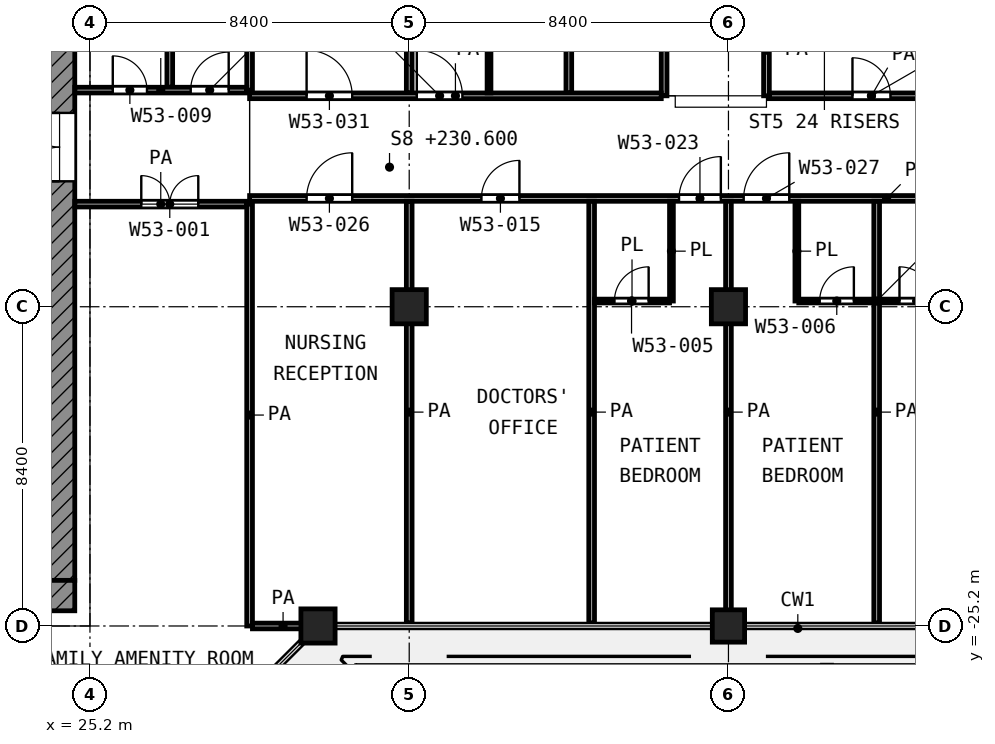
"""IFC4 building model, lengths in metres.
Left out: names, types, materials, properties, quantities, classifications, styles, units other than length and angle.
Written with IfcOpenShell. Run it as: python <this file> out.ifc"""

import sys

from ifc_helpers import new_model, si_unit, direction, frame, frame_2d, origin, origin_2d, place, context, subcontext, project, spatial, rectangle, extrude, element, fill, save


model = new_model("IFC4")
c1 = context("Model", 3, precision=1e-05, world=origin(), true_north=direction((0.0, 1.0)))
c2 = subcontext(c1, "Body", "Model", "MODEL_VIEW")
j1 = project(units=[si_unit("LENGTHUNIT", "METRE"), si_unit("PLANEANGLEUNIT", "RADIAN")], contexts=[c1])
p1 = place(None, origin())
s1 = spatial("IfcSite", under=j1, at=p1, CompositionType="ELEMENT")
p2 = place(p1, origin())
s2 = spatial("IfcBuilding", under=s1, at=p2, CompositionType="ELEMENT")
p3 = place(p2, frame((0.0, 0.0, 230.6)))
s3 = spatial("IfcBuildingStorey", under=s2, at=p3, CompositionType="ELEMENT", Elevation=230.6)
for number, where, z_axis, x_axis in (
    (1, (33.6, -16.8, 0.0), (0.0, 0.0, 1.0), (1.0, 0.0, 0.0)),
    (2, (42.0, -16.8, 0.0), (0.0, 0.0, 1.0), (1.0, 0.0, 0.0)),
    (3, (31.2, -25.2, 0.0), (0.0, 0.0, 1.0), (1.0, 0.0, 0.0)),
):
    element("IfcColumn", number, at=place(p3, frame(where, z_axis=z_axis, x_axis=x_axis)), inside=s3, PredefinedType="COLUMN", context=c2, shape_type="SweptSolid", body=[
        extrude(rectangle(XDim=0.9, YDim=0.9, at=origin_2d()), origin(), (0.0, 0.0, 1.0), 4.2),
    ])
p4 = place(p3, frame((42.0, -25.2, 0.0), z_axis=(0.0, 0.0, 1.0), x_axis=(1.0, 0.0, 0.0)))
e4 = element("IfcColumn", 4, at=p4, inside=s3, PredefinedType="COLUMN", context=c2, shape_type="SweptSolid", body=[
    extrude(rectangle(XDim=0.85, YDim=0.85, at=origin_2d()), origin(), (0.0, 0.0, 1.0), 4.2),
])
p5 = place(p3, frame((24.4, -24.0, 0.0), z_axis=(0.0, 0.0, 1.0), x_axis=(0.0, 1.0, 0.0)))
e5 = element("IfcWall", 5, at=p5, inside=s3, PredefinedType="SHEAR", context=c2, shape_type="SweptSolid", body=[
    extrude(rectangle(XDim=18.6, YDim=0.8, at=frame_2d((9.3, 0.0))), origin(), (0.0, 0.0, 1.0), 3.6),
])
p6 = place(p5, frame((10.5, 0.0, 0.0)))
e6 = element("IfcOpeningElement", 6, at=p6, cuts=e5, PredefinedType="OPENING", context=c2, shape_type="SweptSolid", body=[
    extrude(rectangle(XDim=1.8, YDim=2.1, at=frame_2d((0.9, 1.05))), frame((0.0, 0.41, 0.0), z_axis=(0.0, -1.0, 0.0), x_axis=(1.0, 0.0, 0.0)), (0.0, 0.0, 1.0), 0.82),
])
p7 = place(p3, frame((24.4, -24.8, 0.0), z_axis=(0.0, 0.0, 1.0), x_axis=(0.0, 1.0, 0.0)))
e7 = element("IfcWall", 7, at=p7, inside=s3, PredefinedType="SHEAR", context=c2, shape_type="SweptSolid", body=[
    extrude(rectangle(XDim=0.8, YDim=0.8, at=frame_2d((0.4, 0.0))), origin(), (0.0, 0.0, 1.0), 3.6),
])
p8 = place(p3, frame((38.475, -16.65, 0.0), z_axis=(0.0, 0.0, 1.0), x_axis=(1.0, 0.0, 0.0)))
e8 = element("IfcWall", 8, at=p8, inside=s3, PredefinedType="PARTITIONING", context=c2, shape_type="SweptSolid", body=[
    extrude(rectangle(XDim=1.975, YDim=0.1, at=frame_2d((0.987, 0.0))), origin(), (0.0, 0.0, 1.0), 3.6),
])
p9 = place(p8, frame((0.525, 0.0, 0.0)))
e9 = element("IfcOpeningElement", 9, at=p9, cuts=e8, PredefinedType="OPENING", context=c2, shape_type="SweptSolid", body=[
    extrude(rectangle(XDim=0.9, YDim=2.1, at=frame_2d((0.45, 1.05))), frame((0.0, 0.06, 0.0), z_axis=(0.0, -1.0, 0.0), x_axis=(1.0, 0.0, 0.0)), (0.0, 0.0, 1.0), 0.12),
])
p10 = place(p3, frame((43.85, -16.65, 0.0), z_axis=(0.0, 0.0, 1.0), x_axis=(1.0, 0.0, 0.0)))
e10 = element("IfcWall", 10, at=p10, inside=s3, PredefinedType="PARTITIONING", context=c2, shape_type="SweptSolid", body=[
    extrude(rectangle(XDim=4.1, YDim=0.1, at=frame_2d((2.05, 0.0))), origin(), (0.0, 0.0, 1.0), 3.6),
])
p11 = place(p10, frame((0.55, 0.0, 0.0)))
e11 = element("IfcOpeningElement", 11, at=p11, cuts=e10, PredefinedType="OPENING", context=c2, shape_type="SweptSolid", body=[
    extrude(rectangle(XDim=0.9, YDim=2.1, at=frame_2d((0.45, 1.05))), frame((0.0, 0.06, 0.0), z_axis=(0.0, -1.0, 0.0), x_axis=(1.0, 0.0, 0.0)), (0.0, 0.0, 1.0), 0.12),
])
p12 = place(p10, frame((2.65, 0.0, 0.0)))
e12 = element("IfcOpeningElement", 12, at=p12, cuts=e10, PredefinedType="OPENING", context=c2, shape_type="SweptSolid", body=[
    extrude(rectangle(XDim=0.9, YDim=2.1, at=frame_2d((0.45, 1.05))), frame((0.0, 0.06, 0.0), z_axis=(0.0, -1.0, 0.0), x_axis=(1.0, 0.0, 0.0)), (0.0, 0.0, 1.0), 0.12),
])
for number, where, z_axis, x_axis in (
    (13, (35.7, -11.175, 0.0), (0.0, 0.0, 1.0), (0.0, 1.0, 0.0)),
    (14, (40.5, -16.65, 0.0), (0.0, 0.0, 1.0), (0.0, 1.0, 0.0)),
    (15, (43.8, -16.65, 0.0), (0.0, 0.0, 1.0), (0.0, 1.0, 0.0)),
):
    element("IfcWall", number, at=place(p3, frame(where, z_axis=z_axis, x_axis=x_axis)), inside=s3, PredefinedType="PARTITIONING", context=c2, shape_type="SweptSolid", body=[
        extrude(rectangle(XDim=2.625, YDim=0.1, at=frame_2d((1.312, 0.0))), origin(), (0.0, 0.0, 1.0), 3.6),
    ])
p13 = place(p3, frame((29.475, -25.2, 0.0), z_axis=(0.0, 0.0, 1.0), x_axis=(1.0, 0.0, 0.0)))
e16 = element("IfcWall", 16, at=p13, inside=s3, PredefinedType="PARTITIONING", context=c2, shape_type="SweptSolid", body=[
    extrude(rectangle(XDim=1.612, YDim=0.15, at=frame_2d((0.806, 0.0))), origin(), (0.0, 0.0, 1.0), 3.6),
])
p14 = place(p3, frame((24.8, -14.1, 0.0), z_axis=(0.0, 0.0, 1.0), x_axis=(1.0, 0.0, 0.0)))
e17 = element("IfcWall", 17, at=p14, inside=s3, PredefinedType="PARTITIONING", context=c2, shape_type="SweptSolid", body=[
    extrude(rectangle(XDim=4.525, YDim=0.15, at=frame_2d((2.262, 0.0))), origin(), (0.0, 0.0, 1.0), 3.6),
])
p15 = place(p14, frame((1.75, 0.0, 0.0)))
e18 = element("IfcOpeningElement", 18, at=p15, cuts=e17, PredefinedType="OPENING", context=c2, shape_type="SweptSolid", body=[
    extrude(rectangle(XDim=1.5, YDim=2.1, at=frame_2d((0.75, 1.05))), frame((0.0, 0.085, 0.0), z_axis=(0.0, -1.0, 0.0), x_axis=(1.0, 0.0, 0.0)), (0.0, 0.0, 1.0), 0.17),
])
p16 = place(p3, frame((29.4, -13.95, 0.0), z_axis=(0.0, 0.0, 1.0), x_axis=(1.0, 0.0, 0.0)))
e19 = element("IfcWall", 19, at=p16, inside=s3, PredefinedType="PARTITIONING", context=c2, shape_type="SweptSolid", body=[
    extrude(rectangle(XDim=33.52, YDim=0.15, at=frame_2d((16.76, 0.0))), origin(), (0.0, 0.0, 1.0), 2.7),
])
p17 = place(p16, frame((1.5, 0.0, 0.0)))
e20 = element("IfcOpeningElement", 20, at=p17, cuts=e19, PredefinedType="OPENING", context=c2, shape_type="SweptSolid", body=[
    extrude(rectangle(XDim=1.2, YDim=2.1, at=frame_2d((0.6, 1.05))), frame((0.0, 0.085, 0.0), z_axis=(0.0, -1.0, 0.0), x_axis=(1.0, 0.0, 0.0)), (0.0, 0.0, 1.0), 0.17),
])
p18 = place(p16, frame((6.1, 0.0, 0.0)))
e21 = element("IfcOpeningElement", 21, at=p18, cuts=e19, PredefinedType="OPENING", context=c2, shape_type="SweptSolid", body=[
    extrude(rectangle(XDim=1.0, YDim=2.1, at=frame_2d((0.5, 1.05))), frame((0.0, 0.085, 0.0), z_axis=(0.0, -1.0, 0.0), x_axis=(1.0, 0.0, 0.0)), (0.0, 0.0, 1.0), 0.17),
])
p19 = place(p16, frame((11.3, 0.0, 0.0)))
e22 = element("IfcOpeningElement", 22, at=p19, cuts=e19, PredefinedType="OPENING", context=c2, shape_type="SweptSolid", body=[
    extrude(rectangle(XDim=1.1, YDim=2.1, at=frame_2d((0.55, 1.05))), frame((0.0, 0.085, 0.0), z_axis=(0.0, -1.0, 0.0), x_axis=(1.0, 0.0, 0.0)), (0.0, 0.0, 1.0), 0.17),
])
p20 = place(p16, frame((13.0, 0.0, 0.0)))
e23 = element("IfcOpeningElement", 23, at=p20, cuts=e19, PredefinedType="OPENING", context=c2, shape_type="SweptSolid", body=[
    extrude(rectangle(XDim=1.2, YDim=2.1, at=frame_2d((0.6, 1.05))), frame((0.0, 0.085, 0.0), z_axis=(0.0, -1.0, 0.0), x_axis=(1.0, 0.0, 0.0)), (0.0, 0.0, 1.0), 0.17),
])
p21 = place(p16, frame((22.6, 0.0, 0.0)))
e24 = element("IfcOpeningElement", 24, at=p21, cuts=e19, PredefinedType="OPENING", context=c2, shape_type="SweptSolid", body=[
    extrude(rectangle(XDim=1.2, YDim=2.1, at=frame_2d((0.6, 1.05))), frame((0.0, 0.085, 0.0), z_axis=(0.0, -1.0, 0.0), x_axis=(1.0, 0.0, 0.0)), (0.0, 0.0, 1.0), 0.17),
])
p22 = place(p16, frame((20.3, 0.0, 0.0)))
e25 = element("IfcOpeningElement", 25, at=p22, cuts=e19, PredefinedType="OPENING", context=c2, shape_type="SweptSolid", body=[
    extrude(rectangle(XDim=1.2, YDim=2.1, at=frame_2d((0.6, 1.05))), frame((0.0, 0.085, 0.0), z_axis=(0.0, -1.0, 0.0), x_axis=(1.0, 0.0, 0.0)), (0.0, 0.0, 1.0), 0.17),
])
p23 = place(p16, frame((28.0, 0.0, 0.0)))
e26 = element("IfcOpeningElement", 26, at=p23, cuts=e19, PredefinedType="OPENING", context=c2, shape_type="SweptSolid", body=[
    extrude(rectangle(XDim=1.2, YDim=2.1, at=frame_2d((0.6, 1.05))), frame((0.0, 0.085, 0.0), z_axis=(0.0, -1.0, 0.0), x_axis=(1.0, 0.0, 0.0)), (0.0, 0.0, 1.0), 0.17),
])
p24 = place(p16, frame((31.0, 0.0, 0.0)))
e27 = element("IfcOpeningElement", 27, at=p24, cuts=e19, PredefinedType="OPENING", context=c2, shape_type="SweptSolid", body=[
    extrude(rectangle(XDim=1.0, YDim=2.1, at=frame_2d((0.5, 1.05))), frame((0.0, 0.085, 0.0), z_axis=(0.0, -1.0, 0.0), x_axis=(1.0, 0.0, 0.0)), (0.0, 0.0, 1.0), 0.17),
])
p25 = place(p3, frame((29.4, -11.25, 0.0), z_axis=(0.0, 0.0, 1.0), x_axis=(1.0, 0.0, 0.0)))
e28 = element("IfcWall", 28, at=p25, inside=s3, PredefinedType="PARTITIONING", context=c2, shape_type="SweptSolid", body=[
    extrude(rectangle(XDim=10.832, YDim=0.15, at=frame_2d((5.416, 0.0))), origin(), (0.0, 0.0, 1.0), 3.6),
])
p26 = place(p25, frame((4.4, 0.0, 0.0)))
e29 = element("IfcOpeningElement", 29, at=p26, cuts=e28, PredefinedType="OPENING", context=c2, shape_type="SweptSolid", body=[
    extrude(rectangle(XDim=1.2, YDim=2.1, at=frame_2d((0.6, 1.05))), frame((0.0, 0.085, 0.0), z_axis=(0.0, -1.0, 0.0), x_axis=(1.0, 0.0, 0.0)), (0.0, 0.0, 1.0), 0.17),
])
p27 = place(p25, frame((1.5, 0.0, 0.0)))
e30 = element("IfcOpeningElement", 30, at=p27, cuts=e28, PredefinedType="OPENING", context=c2, shape_type="SweptSolid", body=[
    extrude(rectangle(XDim=1.2, YDim=2.1, at=frame_2d((0.6, 1.05))), frame((0.0, 0.085, 0.0), z_axis=(0.0, -1.0, 0.0), x_axis=(1.0, 0.0, 0.0)), (0.0, 0.0, 1.0), 0.17),
])
p28 = place(p3, frame((43.075, -11.25, 0.0), z_axis=(0.0, 0.0, 1.0), x_axis=(1.0, 0.0, 0.0)))
e31 = element("IfcWall", 31, at=p28, inside=s3, PredefinedType="PARTITIONING", context=c2, shape_type="SweptSolid", body=[
    extrude(rectangle(XDim=5.375, YDim=0.15, at=frame_2d((2.688, 0.0))), origin(), (0.0, 0.0, 1.0), 3.6),
])
p29 = place(p28, frame((2.188, 0.0, 0.0)))
e32 = element("IfcOpeningElement", 32, at=p29, cuts=e31, PredefinedType="OPENING", context=c2, shape_type="SweptSolid", body=[
    extrude(rectangle(XDim=1.0, YDim=2.1, at=frame_2d((0.5, 1.05))), frame((0.0, 0.085, 0.0), z_axis=(0.0, -1.0, 0.0), x_axis=(1.0, 0.0, 0.0)), (0.0, 0.0, 1.0), 0.17),
])
p30 = place(p3, frame((24.8, -11.1, 0.0), z_axis=(0.0, 0.0, 1.0), x_axis=(1.0, 0.0, 0.0)))
e33 = element("IfcWall", 33, at=p30, inside=s3, PredefinedType="PARTITIONING", context=c2, shape_type="SweptSolid", body=[
    extrude(rectangle(XDim=4.525, YDim=0.15, at=frame_2d((2.262, 0.0))), origin(), (0.0, 0.0, 1.0), 3.6),
])
p31 = place(p30, frame((1.0, 0.0, 0.0)))
e34 = element("IfcOpeningElement", 34, at=p31, cuts=e33, PredefinedType="OPENING", context=c2, shape_type="SweptSolid", body=[
    extrude(rectangle(XDim=0.9, YDim=2.1, at=frame_2d((0.45, 1.05))), frame((0.0, 0.085, 0.0), z_axis=(0.0, -1.0, 0.0), x_axis=(1.0, 0.0, 0.0)), (0.0, 0.0, 1.0), 0.17),
])
p32 = place(p30, frame((3.05, 0.0, 0.0)))
e35 = element("IfcOpeningElement", 35, at=p32, cuts=e33, PredefinedType="OPENING", context=c2, shape_type="SweptSolid", body=[
    extrude(rectangle(XDim=1.0, YDim=2.1, at=frame_2d((0.5, 1.05))), frame((0.0, 0.085, 0.0), z_axis=(0.0, -1.0, 0.0), x_axis=(1.0, 0.0, 0.0)), (0.0, 0.0, 1.0), 0.17),
])
p33 = place(p3, frame((27.3, -11.025, 0.0), z_axis=(0.0, 0.0, 1.0), x_axis=(0.0, 1.0, 0.0)))
e36 = element("IfcWall", 36, at=p33, inside=s3, PredefinedType="PARTITIONING", context=c2, shape_type="SweptSolid", body=[
    extrude(rectangle(XDim=10.945, YDim=0.15, at=frame_2d((5.472, 0.0))), origin(), (0.0, 0.0, 1.0), 3.6),
])
p34 = place(p3, frame((29.4, -25.2, 0.0), z_axis=(0.0, 0.0, 1.0), x_axis=(0.0, 1.0, 0.0)))
e37 = element("IfcWall", 37, at=p34, inside=s3, PredefinedType="PARTITIONING", context=c2, shape_type="SweptSolid", body=[
    extrude(rectangle(XDim=11.1, YDim=0.15, at=frame_2d((5.55, 0.0))), origin(), (0.0, 0.0, 1.0), 3.6),
])
p35 = place(p3, frame((29.4, -11.1, 0.0), z_axis=(0.0, 0.0, 1.0), x_axis=(0.0, 1.0, 0.0)))
e38 = element("IfcWall", 38, at=p35, inside=s3, PredefinedType="PARTITIONING", context=c2, shape_type="SweptSolid", body=[
    extrude(rectangle(XDim=11.02, YDim=0.15, at=frame_2d((5.51, 0.0))), origin(), (0.0, 0.0, 1.0), 3.6),
])
p36 = place(p3, frame((33.6, -25.12, 0.0), z_axis=(0.0, 0.0, 1.0), x_axis=(0.0, 1.0, 0.0)))
e39 = element("IfcWall", 39, at=p36, inside=s3, PredefinedType="PARTITIONING", context=c2, shape_type="SweptSolid", body=[
    extrude(rectangle(XDim=11.095, YDim=0.15, at=frame_2d((5.548, 0.0))), origin(), (0.0, 0.0, 1.0), 3.6),
])
for number, where, z_axis, x_axis in (
    (40, (33.6, -11.175, 0.0), (0.0, 0.0, 1.0), (0.0, 1.0, 0.0)),
    (41, (37.8, -11.175, 0.0), (0.0, 0.0, 1.0), (0.0, 1.0, 0.0)),
):
    element("IfcWall", number, at=place(p3, frame(where, z_axis=z_axis, x_axis=x_axis)), inside=s3, PredefinedType="PARTITIONING", context=c2, shape_type="SweptSolid", body=[
        extrude(rectangle(XDim=11.095, YDim=0.15, at=frame_2d((5.547, 0.0))), origin(), (0.0, 0.0, 1.0), 3.6),
    ])
p37 = place(p3, frame((38.4, -25.12, 0.0), z_axis=(0.0, 0.0, 1.0), x_axis=(0.0, 1.0, 0.0)))
e42 = element("IfcWall", 42, at=p37, inside=s3, PredefinedType="PARTITIONING", context=c2, shape_type="SweptSolid", body=[
    extrude(rectangle(XDim=11.095, YDim=0.15, at=frame_2d((5.548, 0.0))), origin(), (0.0, 0.0, 1.0), 3.6),
])
p38 = place(p3, frame((40.307, -11.25, 0.0), z_axis=(0.0, 0.0, 1.0), x_axis=(0.0, 1.0, 0.0)))
e43 = element("IfcWall", 43, at=p38, inside=s3, PredefinedType="PARTITIONING", context=c2, shape_type="SweptSolid", body=[
    extrude(rectangle(XDim=11.17, YDim=0.15, at=frame_2d((5.585, 0.0))), origin(), (0.0, 0.0, 1.0), 3.6),
])
p39 = place(p38, frame((5.125, 0.0, 0.0)))
e44 = element("IfcOpeningElement", 44, at=p39, cuts=e43, PredefinedType="OPENING", context=c2, shape_type="SweptSolid", body=[
    extrude(rectangle(XDim=1.0, YDim=2.1, at=frame_2d((0.5, 1.05))), frame((0.0, 0.085, 0.0), z_axis=(0.0, -1.0, 0.0), x_axis=(1.0, 0.0, 0.0)), (0.0, 0.0, 1.0), 0.17),
])
p40 = place(p3, frame((42.0, -25.12, 0.0), z_axis=(0.0, 0.0, 1.0), x_axis=(0.0, 1.0, 0.0)))
e45 = element("IfcWall", 45, at=p40, inside=s3, PredefinedType="PARTITIONING", context=c2, shape_type="SweptSolid", body=[
    extrude(rectangle(XDim=11.095, YDim=0.15, at=frame_2d((5.548, 0.0))), origin(), (0.0, 0.0, 1.0), 3.6),
])
p41 = place(p3, frame((43.0, -11.25, 0.0), z_axis=(0.0, 0.0, 1.0), x_axis=(0.0, 1.0, 0.0)))
e46 = element("IfcWall", 46, at=p41, inside=s3, PredefinedType="PARTITIONING", context=c2, shape_type="SweptSolid", body=[
    extrude(rectangle(XDim=2.398, YDim=0.15, at=frame_2d((1.199, 0.0))), origin(), (0.0, 0.0, 1.0), 3.6),
])
p42 = place(p3, frame((45.9, -25.12, 0.0), z_axis=(0.0, 0.0, 1.0), x_axis=(0.0, 1.0, 0.0)))
e47 = element("IfcWall", 47, at=p42, inside=s3, PredefinedType="PARTITIONING", context=c2, shape_type="SweptSolid", body=[
    extrude(rectangle(XDim=11.095, YDim=0.15, at=frame_2d((5.548, 0.0))), origin(), (0.0, 0.0, 1.0), 3.6),
])
p43 = place(p6, origin())
e48 = element("IfcDoor", 48, at=p43, inside=s3, OperationType="DOUBLE_DOOR_SINGLE_SWING", PredefinedType="DOOR", context=c2, shape_type="SweptSolid", body=[
    extrude(rectangle(XDim=1.8, YDim=2.1, at=frame_2d((0.9, 1.05))), frame((0.0, 0.025, 0.0), z_axis=(0.0, -1.0, 0.0), x_axis=(1.0, 0.0, 0.0)), (0.0, 0.0, 1.0), 0.05),
])
fill(e6, e48)
p44 = place(p15, origin())
e49 = element("IfcDoor", 49, at=p44, inside=s3, OperationType="DOUBLE_DOOR_SINGLE_SWING", PredefinedType="DOOR", context=c2, shape_type="SweptSolid", body=[
    extrude(rectangle(XDim=1.5, YDim=2.1, at=frame_2d((0.75, 1.05))), frame((0.0, 0.025, 0.0), z_axis=(0.0, -1.0, 0.0), x_axis=(1.0, 0.0, 0.0)), (0.0, 0.0, 1.0), 0.05),
])
fill(e18, e49)
p45 = place(p26, origin())
e50 = element("IfcDoor", 50, at=p45, inside=s3, OperationType="SINGLE_SWING_LEFT", PredefinedType="DOOR", context=c2, shape_type="SweptSolid", body=[
    extrude(rectangle(XDim=1.2, YDim=2.1, at=frame_2d((0.6, 1.05))), frame((0.0, 0.025, 0.0), z_axis=(0.0, -1.0, 0.0), x_axis=(1.0, 0.0, 0.0)), (0.0, 0.0, 1.0), 0.05),
])
fill(e29, e50)
p46 = place(p29, origin())
e51 = element("IfcDoor", 51, at=p46, inside=s3, OperationType="SINGLE_SWING_LEFT", PredefinedType="DOOR", context=c2, shape_type="SweptSolid", body=[
    extrude(rectangle(XDim=1.0, YDim=2.1, at=frame_2d((0.5, 1.05))), frame((0.0, 0.025, 0.0), z_axis=(0.0, -1.0, 0.0), x_axis=(1.0, 0.0, 0.0)), (0.0, 0.0, 1.0), 0.05),
])
fill(e32, e51)
p47 = place(p17, origin())
e52 = element("IfcDoor", 52, at=p47, inside=s3, OperationType="SINGLE_SWING_RIGHT", PredefinedType="DOOR", context=c2, shape_type="SweptSolid", body=[
    extrude(rectangle(XDim=1.2, YDim=2.1, at=frame_2d((0.6, 1.05))), frame((0.0, 0.025, 0.0), z_axis=(0.0, -1.0, 0.0), x_axis=(1.0, 0.0, 0.0)), (0.0, 0.0, 1.0), 0.05),
])
fill(e20, e52)
p48 = place(p18, origin())
e53 = element("IfcDoor", 53, at=p48, inside=s3, OperationType="SINGLE_SWING_RIGHT", PredefinedType="DOOR", context=c2, shape_type="SweptSolid", body=[
    extrude(rectangle(XDim=1.0, YDim=2.1, at=frame_2d((0.5, 1.05))), frame((0.0, 0.025, 0.0), z_axis=(0.0, -1.0, 0.0), x_axis=(1.0, 0.0, 0.0)), (0.0, 0.0, 1.0), 0.05),
])
fill(e21, e53)
p49 = place(p19, origin())
e54 = element("IfcDoor", 54, at=p49, inside=s3, OperationType="SINGLE_SWING_RIGHT", PredefinedType="DOOR", context=c2, shape_type="SweptSolid", body=[
    extrude(rectangle(XDim=1.1, YDim=2.1, at=frame_2d((0.55, 1.05))), frame((0.0, 0.025, 0.0), z_axis=(0.0, -1.0, 0.0), x_axis=(1.0, 0.0, 0.0)), (0.0, 0.0, 1.0), 0.05),
])
fill(e22, e54)
p50 = place(p9, origin())
e55 = element("IfcDoor", 55, at=p50, inside=s3, OperationType="SINGLE_SWING_RIGHT", PredefinedType="DOOR", context=c2, shape_type="SweptSolid", body=[
    extrude(rectangle(XDim=0.9, YDim=2.1, at=frame_2d((0.45, 1.05))), frame((0.0, 0.025, 0.0), z_axis=(0.0, -1.0, 0.0), x_axis=(1.0, 0.0, 0.0)), (0.0, 0.0, 1.0), 0.05),
])
fill(e9, e55)
p51 = place(p20, origin())
e56 = element("IfcDoor", 56, at=p51, inside=s3, OperationType="SINGLE_SWING_RIGHT", PredefinedType="DOOR", context=c2, shape_type="SweptSolid", body=[
    extrude(rectangle(XDim=1.2, YDim=2.1, at=frame_2d((0.6, 1.05))), frame((0.0, 0.025, 0.0), z_axis=(0.0, -1.0, 0.0), x_axis=(1.0, 0.0, 0.0)), (0.0, 0.0, 1.0), 0.05),
])
fill(e23, e56)
p52 = place(p11, origin())
e57 = element("IfcDoor", 57, at=p52, inside=s3, OperationType="SINGLE_SWING_RIGHT", PredefinedType="DOOR", context=c2, shape_type="SweptSolid", body=[
    extrude(rectangle(XDim=0.9, YDim=2.1, at=frame_2d((0.45, 1.05))), frame((0.0, 0.025, 0.0), z_axis=(0.0, -1.0, 0.0), x_axis=(1.0, 0.0, 0.0)), (0.0, 0.0, 1.0), 0.05),
])
fill(e11, e57)
p53 = place(p12, origin())
e58 = element("IfcDoor", 58, at=p53, inside=s3, OperationType="SINGLE_SWING_LEFT", PredefinedType="DOOR", context=c2, shape_type="SweptSolid", body=[
    extrude(rectangle(XDim=0.9, YDim=2.1, at=frame_2d((0.45, 1.05))), frame((0.0, 0.025, 0.0), z_axis=(0.0, -1.0, 0.0), x_axis=(1.0, 0.0, 0.0)), (0.0, 0.0, 1.0), 0.05),
])
fill(e12, e58)
p54 = place(p31, origin())
e59 = element("IfcDoor", 59, at=p54, inside=s3, OperationType="SINGLE_SWING_LEFT", PredefinedType="DOOR", context=c2, shape_type="SweptSolid", body=[
    extrude(rectangle(XDim=0.9, YDim=2.1, at=frame_2d((0.45, 1.05))), frame((0.0, 0.025, 0.0), z_axis=(0.0, -1.0, 0.0), x_axis=(1.0, 0.0, 0.0)), (0.0, 0.0, 1.0), 0.05),
])
fill(e34, e59)
p55 = place(p32, origin())
e60 = element("IfcDoor", 60, at=p55, inside=s3, OperationType="SINGLE_SWING_RIGHT", PredefinedType="DOOR", context=c2, shape_type="SweptSolid", body=[
    extrude(rectangle(XDim=1.0, YDim=2.1, at=frame_2d((0.5, 1.05))), frame((0.0, 0.025, 0.0), z_axis=(0.0, -1.0, 0.0), x_axis=(1.0, 0.0, 0.0)), (0.0, 0.0, 1.0), 0.05),
])
fill(e35, e60)
p56 = place(p27, origin())
e61 = element("IfcDoor", 61, at=p56, inside=s3, OperationType="SINGLE_SWING_LEFT", PredefinedType="DOOR", context=c2, shape_type="SweptSolid", body=[
    extrude(rectangle(XDim=1.2, YDim=2.1, at=frame_2d((0.6, 1.05))), frame((0.0, 0.025, 0.0), z_axis=(0.0, -1.0, 0.0), x_axis=(1.0, 0.0, 0.0)), (0.0, 0.0, 1.0), 0.05),
])
fill(e30, e61)
save(model, sys.argv[1])
